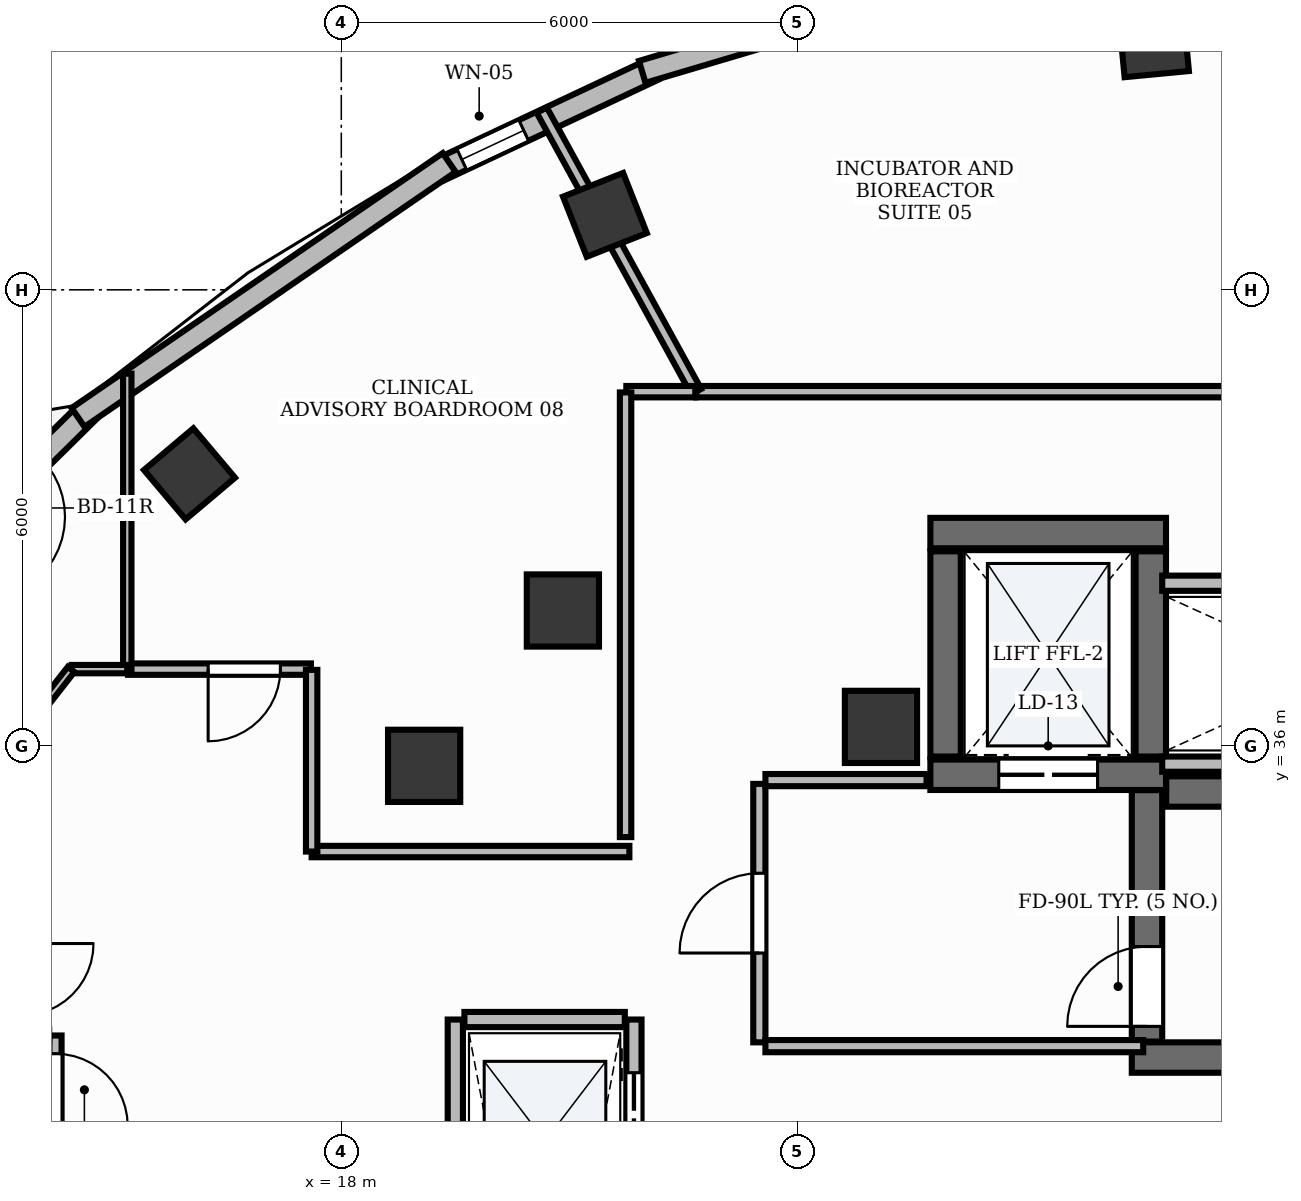
"""IFC4 building model, lengths in metres.
Left out: names, types, materials, properties, quantities, classifications, styles, units other than length and angle.
Written with IfcOpenShell. Run it as: python <this file> out.ifc"""

import sys

from ifc_helpers import new_model, si_unit, direction, frame, frame_2d, origin, origin_2d, place, context, subcontext, project, spatial, rectangle, extrude, element, fill, save


model = new_model("IFC4")
c1 = context("Model", 3, precision=1e-05, world=origin(), true_north=direction((0.0, 1.0)))
c2 = subcontext(c1, "Body", "Model", "MODEL_VIEW")
j1 = project(units=[si_unit("LENGTHUNIT", "METRE"), si_unit("PLANEANGLEUNIT", "RADIAN")], contexts=[c1])
p1 = place(None, origin())
s1 = spatial("IfcSite", under=j1, at=p1, CompositionType="ELEMENT")
p2 = place(p1, origin())
s2 = spatial("IfcBuilding", under=s1, at=p2, CompositionType="ELEMENT")
p3 = place(p2, frame((0.0, 0.0, 268.8)))
s3 = spatial("IfcBuildingStorey", under=s2, at=p3, CompositionType="ELEMENT", Elevation=268.8)
p4 = place(p3, frame((28.852, 35.4, 0.0), z_axis=(0.0, 0.0, 1.0), x_axis=(1.0, 0.0, 0.0)))
e1 = element("IfcWall", 1, at=p4, inside=s3, PredefinedType="SHEAR", context=c2, shape_type="SweptSolid", body=[
    extrude(rectangle(XDim=8.198, YDim=0.4, at=frame_2d((4.099, 0.0))), origin(), (0.0, 0.0, 1.0), 3.9),
])
p5 = place(p3, frame((28.4, 31.9, 0.0), z_axis=(0.0, 0.0, 1.0), x_axis=(1.0, 0.0, 0.0)))
e2 = element("IfcWall", 2, at=p5, inside=s3, PredefinedType="SHEAR", context=c2, shape_type="SweptSolid", body=[
    extrude(rectangle(XDim=8.65, YDim=0.4, at=frame_2d((4.325, 0.0))), origin(), (0.0, 0.0, 1.0), 3.9),
])
p6 = place(p3, frame((28.6, 32.11, 0.0), z_axis=(0.0, 0.0, 1.0), x_axis=(0.0, 1.0, 0.0)))
e3 = element("IfcWall", 3, at=p6, inside=s3, PredefinedType="SHEAR", context=c2, shape_type="SweptSolid", body=[
    extrude(rectangle(XDim=3.308, YDim=0.4, at=frame_2d((1.654, 0.0))), origin(), (0.0, 0.0, 1.0), 3.9),
])
p7 = place(p6, frame((0.2, 0.0, 0.0)))
e4 = element("IfcOpeningElement", 4, at=p7, cuts=e3, PredefinedType="OPENING", context=c2, shape_type="SweptSolid", body=[
    extrude(rectangle(XDim=1.05, YDim=2.15, at=frame_2d((0.525, 1.075))), frame((0.0, 0.215, 0.0), z_axis=(0.0, -1.0, 0.0), x_axis=(1.0, 0.0, 0.0)), (0.0, 0.0, 1.0), 0.43),
])
p8 = place(p3, frame((25.75, 38.8, 0.0), z_axis=(0.0, 0.0, 1.0), x_axis=(1.0, 0.0, 0.0)))
e5 = element("IfcWall", 5, at=p8, inside=s3, PredefinedType="SHEAR", context=c2, shape_type="SweptSolid", body=[
    extrude(rectangle(XDim=3.1, YDim=0.4, at=frame_2d((1.55, 0.0))), origin(), (0.0, 0.0, 1.0), 3.9),
])
p9 = place(p3, frame((25.75, 35.62, 0.0), z_axis=(0.0, 0.0, 1.0), x_axis=(1.0, 0.0, 0.0)))
e6 = element("IfcWall", 6, at=p9, inside=s3, PredefinedType="SHEAR", context=c2, shape_type="SweptSolid", body=[
    extrude(rectangle(XDim=3.1, YDim=0.4, at=frame_2d((1.55, 0.0))), origin(), (0.0, 0.0, 1.0), 3.9),
])
p10 = place(p9, frame((0.9, 0.0, 0.0)))
e7 = element("IfcOpeningElement", 7, at=p10, cuts=e6, PredefinedType="OPENING", context=c2, shape_type="SweptSolid", body=[
    extrude(rectangle(XDim=1.3, YDim=2.2, at=frame_2d((0.65, 1.1))), frame((0.0, 0.215, 0.0), z_axis=(0.0, -1.0, 0.0), x_axis=(1.0, 0.0, 0.0)), (0.0, 0.0, 1.0), 0.43),
])
for number, where, z_axis, x_axis in (
    (8, (25.95, 35.86, 0.0), (0.0, 0.0, 1.0), (0.0, 1.0, 0.0)),
    (9, (28.65, 35.86, 0.0), (0.0, 0.0, 1.0), (0.0, 1.0, 0.0)),
):
    element("IfcWall", number, at=place(p3, frame(where, z_axis=z_axis, x_axis=x_axis)), inside=s3, PredefinedType="SHEAR", context=c2, shape_type="SweptSolid", body=[
        extrude(rectangle(XDim=2.7, YDim=0.4, at=frame_2d((1.35, 0.0))), origin(), (0.0, 0.0, 1.0), 3.9),
    ])
p11 = place(p3, frame((25.1, 36.25, -0.0), z_axis=(0.0, 0.0, 1.0), x_axis=(1.0, 0.0, 0.0)))
e10 = element("IfcColumn", 10, at=p11, inside=s3, PredefinedType="PILASTER", context=c2, shape_type="SweptSolid", body=[
    extrude(rectangle(XDim=0.95, YDim=0.95, at=origin_2d()), origin(), (0.0, 0.0, 1.0), 3.901),
])
for number, where, z_axis, x_axis in (
    (11, (28.688, 45.261, -0.0), (0.0, 0.0, 1.0), (0.995, 0.095, 0.0)),
    (12, (21.469, 42.986, -0.0), (0.0, 0.0, 1.0), (0.93, 0.367, 0.0)),
    (13, (16.003, 39.579, -0.0), (0.0, 0.0, 1.0), (0.764, 0.645, 0.0)),
):
    element("IfcColumn", number, at=place(p3, frame(where, z_axis=z_axis, x_axis=x_axis)), inside=s3, PredefinedType="COLUMN", context=c2, shape_type="SweptSolid", body=[
        extrude(rectangle(XDim=0.85, YDim=0.85, at=origin_2d()), origin(), (0.0, 0.0, 1.0), 3.901),
    ])
for number, where, z_axis, x_axis in (
    (14, (20.915, 37.781, -0.0), (0.0, 0.0, 1.0), (1.0, 0.0, 0.0)),
    (15, (19.09, 35.738, -0.0), (0.0, 0.0, 1.0), (1.0, 0.0, 0.0)),
):
    element("IfcColumn", number, at=place(p3, frame(where, z_axis=z_axis, x_axis=x_axis)), inside=s3, PredefinedType="COLUMN", context=c2, shape_type="SweptSolid", body=[
        extrude(rectangle(XDim=0.95, YDim=0.95, at=origin_2d()), origin(), (0.0, 0.0, 1.0), 3.901),
    ])
p12 = place(p3, frame((22.118, 44.905, 0.0), z_axis=(0.0, 0.0, 1.0), x_axis=(-0.904969006582, -0.425477493089, 0.0)))
e16 = element("IfcWall", 16, at=p12, inside=s3, PredefinedType="STANDARD", context=c2, shape_type="SweptSolid", body=[
    extrude(rectangle(XDim=3.128, YDim=0.3, at=frame_2d((1.564, 0.0))), origin(), (0.0, 0.0, 1.0), 3.9),
])
p13 = place(p12, frame((1.899, 0.0, 0.95)))
e17 = element("IfcOpeningElement", 17, at=p13, cuts=e16, PredefinedType="OPENING", context=c2, shape_type="SweptSolid", body=[
    extrude(rectangle(XDim=0.9, YDim=1.8, at=frame_2d((0.45, 0.9))), frame((0.0, 0.165, 0.0), z_axis=(0.0, -1.0, 0.0), x_axis=(1.0, 0.0, 0.0)), (0.0, 0.0, 1.0), 0.33),
])
p14 = place(p3, frame((14.679, 40.411, 0.0), z_axis=(0.0, 0.0, 1.0), x_axis=(-0.711382793294, -0.702804753403, 0.0)))
e18 = element("IfcWall", 18, at=p14, inside=s3, PredefinedType="STANDARD", context=c2, shape_type="SweptSolid", body=[
    extrude(rectangle(XDim=2.875, YDim=0.3, at=frame_2d((1.437, 0.0))), origin(), (0.0, 0.0, 1.0), 3.9),
])
p15 = place(p14, frame((0.887, 0.0, 0.0)))
e19 = element("IfcOpeningElement", 19, at=p15, cuts=e18, PredefinedType="OPENING", context=c2, shape_type="SweptSolid", body=[
    extrude(rectangle(XDim=1.1, YDim=2.15, at=frame_2d((0.55, 1.075))), frame((0.0, 0.165, 0.0), z_axis=(0.0, -1.0, 0.0), x_axis=(1.0, 0.0, 0.0)), (0.0, 0.0, 1.0), 0.33),
])
p16 = place(p3, frame((28.055, 46.677, 0.0), z_axis=(0.0, 0.0, 1.0), x_axis=(-0.958650794435, -0.284585056406, 0.0)))
e20 = element("IfcWall", 20, at=p16, inside=s3, PredefinedType="STANDARD", context=c2, shape_type="SweptSolid", body=[
    extrude(rectangle(XDim=6.359, YDim=0.3, at=frame_2d((3.179, 0.0))), origin(), (0.0, 0.0, 1.0), 3.47),
])
p17 = place(p3, frame((19.419, 43.675, 0.0), z_axis=(0.0, 0.0, 1.0), x_axis=(-0.824290809052, -0.566166638113, 0.0)))
e21 = element("IfcWall", 21, at=p17, inside=s3, PredefinedType="STANDARD", context=c2, shape_type="SweptSolid", body=[
    extrude(rectangle(XDim=5.923, YDim=0.3, at=frame_2d((2.961, 0.0))), origin(), (0.0, 0.0, 1.0), 3.9),
])
p18 = place(p3, frame((19.5, 21.6, 0.0), z_axis=(0.0, 0.0, 1.0), x_axis=(0.0, 1.0, 0.0)))
e22 = element("IfcWall", 22, at=p18, inside=s3, PredefinedType="PARTITIONING", context=c2, shape_type="SweptSolid", body=[
    extrude(rectangle(XDim=10.8, YDim=0.2, at=frame_2d((5.4, 0.0))), origin(), (0.0, 0.0, 1.0), 2.91),
])
p19 = place(p3, frame((21.85, 21.6, 0.0), z_axis=(0.0, 0.0, 1.0), x_axis=(0.0, 1.0, 0.0)))
e23 = element("IfcWall", 23, at=p19, inside=s3, PredefinedType="PARTITIONING", context=c2, shape_type="SweptSolid", body=[
    extrude(rectangle(XDim=10.8, YDim=0.2, at=frame_2d((5.4, 0.0))), origin(), (0.0, 0.0, 1.0), 2.91),
])
p20 = place(p19, frame((0.9, 0.0, 0.0)))
e24 = element("IfcOpeningElement", 24, at=p20, cuts=e23, PredefinedType="OPENING", context=c2, shape_type="SweptSolid", body=[
    extrude(rectangle(XDim=1.1, YDim=2.2, at=frame_2d((0.55, 1.1))), frame((0.0, 0.115, 0.0), z_axis=(0.0, -1.0, 0.0), x_axis=(1.0, 0.0, 0.0)), (0.0, 0.0, 1.0), 0.23),
])
p21 = place(p19, frame((3.6, 0.0, 0.0)))
e25 = element("IfcOpeningElement", 25, at=p21, cuts=e23, PredefinedType="OPENING", context=c2, shape_type="SweptSolid", body=[
    extrude(rectangle(XDim=1.1, YDim=2.2, at=frame_2d((0.55, 1.1))), frame((0.0, 0.115, 0.0), z_axis=(0.0, -1.0, 0.0), x_axis=(1.0, 0.0, 0.0)), (0.0, 0.0, 1.0), 0.23),
])
p22 = place(p19, frame((6.3, 0.0, 0.0)))
e26 = element("IfcOpeningElement", 26, at=p22, cuts=e23, PredefinedType="OPENING", context=c2, shape_type="SweptSolid", body=[
    extrude(rectangle(XDim=1.1, YDim=2.2, at=frame_2d((0.55, 1.1))), frame((0.0, 0.115, 0.0), z_axis=(0.0, -1.0, 0.0), x_axis=(1.0, 0.0, 0.0)), (0.0, 0.0, 1.0), 0.23),
])
p23 = place(p19, frame((9.0, 0.0, 0.0)))
e27 = element("IfcOpeningElement", 27, at=p23, cuts=e23, PredefinedType="OPENING", context=c2, shape_type="SweptSolid", body=[
    extrude(rectangle(XDim=1.1, YDim=2.2, at=frame_2d((0.55, 1.1))), frame((0.0, 0.115, 0.0), z_axis=(0.0, -1.0, 0.0), x_axis=(1.0, 0.0, 0.0)), (0.0, 0.0, 1.0), 0.23),
])
p24 = place(p3, frame((19.62, 32.4, 0.0), z_axis=(0.0, 0.0, 1.0), x_axis=(1.0, 0.0, 0.0)))
e28 = element("IfcWall", 28, at=p24, inside=s3, PredefinedType="PARTITIONING", context=c2, shape_type="SweptSolid", body=[
    extrude(rectangle(XDim=2.11, YDim=0.2, at=frame_2d((1.055, 0.0))), origin(), (0.0, 0.0, 1.0), 2.91),
])
for number, where, z_axis, x_axis in (
    (29, (28.8, 35.76, 0.0), (0.0, 0.0, 1.0), (1.0, 0.0, 0.0)),
    (30, (28.8, 38.14, 0.0), (0.0, 0.0, 1.0), (1.0, 0.0, 0.0)),
):
    element("IfcWall", number, at=place(p3, frame(where, z_axis=z_axis, x_axis=x_axis)), inside=s3, PredefinedType="PARTITIONING", context=c2, shape_type="SweptSolid", body=[
        extrude(rectangle(XDim=4.57, YDim=0.2, at=frame_2d((2.285, 0.0))), origin(), (0.0, 0.0, 1.0), 2.91),
    ])
p25 = place(p3, frame((23.5, 32.1, 0.0), z_axis=(0.0, 0.0, 1.0), x_axis=(0.0, 1.0, 0.0)))
e31 = element("IfcWall", 31, at=p25, inside=s3, PredefinedType="PARTITIONING", context=c2, shape_type="SweptSolid", body=[
    extrude(rectangle(XDim=3.4, YDim=0.16, at=frame_2d((1.7, 0.0))), origin(), (0.0, 0.0, 1.0), 2.91),
])
p26 = place(p25, frame((1.175, 0.0, 0.0)))
e32 = element("IfcOpeningElement", 32, at=p26, cuts=e31, PredefinedType="OPENING", context=c2, shape_type="SweptSolid", body=[
    extrude(rectangle(XDim=1.05, YDim=2.15, at=frame_2d((0.525, 1.075))), frame((0.0, 0.095, 0.0), z_axis=(0.0, -1.0, 0.0), x_axis=(1.0, 0.0, 0.0)), (0.0, 0.0, 1.0), 0.19),
])
p27 = place(p3, frame((23.58, 32.05, 0.0), z_axis=(0.0, 0.0, 1.0), x_axis=(1.0, 0.0, 0.0)))
e33 = element("IfcWall", 33, at=p27, inside=s3, PredefinedType="PARTITIONING", context=c2, shape_type="SweptSolid", body=[
    extrude(rectangle(XDim=4.97, YDim=0.16, at=frame_2d((2.485, 0.0))), origin(), (0.0, 0.0, 1.0), 2.91),
])
p28 = place(p3, frame((23.58, 35.55, 0.0), z_axis=(0.0, 0.0, 1.0), x_axis=(1.0, 0.0, 0.0)))
e34 = element("IfcWall", 34, at=p28, inside=s3, PredefinedType="PARTITIONING", context=c2, shape_type="SweptSolid", body=[
    extrude(rectangle(XDim=2.12, YDim=0.16, at=frame_2d((1.06, 0.0))), origin(), (0.0, 0.0, 1.0), 2.91),
])
p29 = place(p3, frame((14.24, 32.19, 0.0), z_axis=(0.0, 0.0, 1.0), x_axis=(0.0, -1.0, 0.0)))
e35 = element("IfcWall", 35, at=p29, inside=s3, PredefinedType="PARTITIONING", context=c2, shape_type="SweptSolid", body=[
    extrude(rectangle(XDim=4.99, YDim=0.16, at=frame_2d((2.495, 0.0))), origin(), (0.0, 0.0, 1.0), 2.91),
])
p30 = place(p29, frame((0.24, 0.0, 0.0)))
e36 = element("IfcOpeningElement", 36, at=p30, cuts=e35, PredefinedType="OPENING", context=c2, shape_type="SweptSolid", body=[
    extrude(rectangle(XDim=0.95, YDim=2.15, at=frame_2d((0.475, 1.075))), frame((0.0, 0.095, 0.0), z_axis=(0.0, -1.0, 0.0), x_axis=(1.0, 0.0, 0.0)), (0.0, 0.0, 1.0), 0.19),
])
p31 = place(p3, frame((31.806, 40.66, 0.0), z_axis=(0.0, 0.0, 1.0), x_axis=(-1.0, 0.0, 0.0)))
e37 = element("IfcWall", 37, at=p31, inside=s3, PredefinedType="PARTITIONING", context=c2, shape_type="SweptSolid", body=[
    extrude(rectangle(XDim=9.136, YDim=0.15, at=frame_2d((4.568, 0.0))), origin(), (0.0, 0.0, 1.0), 2.91),
])
p32 = place(p31, frame((0.257, 0.0, 0.0)))
e38 = element("IfcOpeningElement", 38, at=p32, cuts=e37, PredefinedType="OPENING", context=c2, shape_type="SweptSolid", body=[
    extrude(rectangle(XDim=0.95, YDim=2.15, at=frame_2d((0.475, 1.075))), frame((0.0, 0.09, 0.0), z_axis=(0.0, -1.0, 0.0), x_axis=(1.0, 0.0, 0.0)), (0.0, 0.0, 1.0), 0.18),
])
p33 = place(p3, frame((17.6, 37.01, 0.0), z_axis=(0.0, 0.0, 1.0), x_axis=(-1.0, 0.0, 0.0)))
e39 = element("IfcWall", 39, at=p33, inside=s3, PredefinedType="PARTITIONING", context=c2, shape_type="SweptSolid", body=[
    extrude(rectangle(XDim=2.406, YDim=0.15, at=frame_2d((1.203, 0.0))), origin(), (0.0, 0.0, 1.0), 2.91),
])
p34 = place(p33, frame((0.402, 0.0, 0.0)))
e40 = element("IfcOpeningElement", 40, at=p34, cuts=e39, PredefinedType="OPENING", context=c2, shape_type="SweptSolid", body=[
    extrude(rectangle(XDim=0.95, YDim=2.15, at=frame_2d((0.475, 1.075))), frame((0.0, 0.09, 0.0), z_axis=(0.0, -1.0, 0.0), x_axis=(1.0, 0.0, 0.0)), (0.0, 0.0, 1.0), 0.18),
])
p35 = place(p3, frame((22.669, 40.66, 0.0), z_axis=(0.0, 0.0, 1.0), x_axis=(-0.480944413436, 0.8767510885, 0.0)))
e41 = element("IfcWall", 41, at=p35, inside=s3, PredefinedType="PARTITIONING", context=c2, shape_type="SweptSolid", body=[
    extrude(rectangle(XDim=4.224, YDim=0.15, at=frame_2d((2.112, 0.0))), origin(), (0.0, 0.0, 1.0), 2.91),
])
p36 = place(p3, frame((15.184, 40.897, 0.0), z_axis=(0.0, 0.0, 1.0), x_axis=(0.0, -1.0, 0.0)))
e42 = element("IfcWall", 42, at=p36, inside=s3, PredefinedType="MOVABLE", context=c2, shape_type="SweptSolid", body=[
    extrude(rectangle(XDim=3.887, YDim=0.11, at=frame_2d((1.943, 0.0))), origin(), (0.0, 0.0, 1.0), 2.91),
])
p37 = place(p3, frame((15.184, 37.01, 0.0), z_axis=(0.0, 0.0, 1.0), x_axis=(-1.0, 0.0, 0.0)))
e43 = element("IfcWall", 43, at=p37, inside=s3, PredefinedType="MOVABLE", context=c2, shape_type="SweptSolid", body=[
    extrude(rectangle(XDim=0.732, YDim=0.11, at=frame_2d((0.366, 0.0))), origin(), (0.0, 0.0, 1.0), 2.91),
])
p38 = place(p3, frame((14.445, 37.006, 0.0), z_axis=(0.0, 0.0, 1.0), x_axis=(-0.615836200745, -0.787874211948, 0.0)))
e44 = element("IfcWall", 44, at=p38, inside=s3, PredefinedType="MOVABLE", context=c2, shape_type="SweptSolid", body=[
    extrude(rectangle(XDim=1.06, YDim=0.11, at=frame_2d((0.53, 0.0))), origin(), (0.0, 0.0, 1.0), 2.91),
])
p39 = place(p3, frame((22.658, 40.66, 0.0), z_axis=(0.0, 0.0, 1.0), x_axis=(-1.0, 0.0, 0.0)))
e45 = element("IfcWall", 45, at=p39, inside=s3, PredefinedType="PARTITIONING", context=c2, shape_type="SweptSolid", body=[
    extrude(rectangle(XDim=0.908, YDim=0.15, at=frame_2d((0.454, 0.0))), origin(), (0.0, 0.0, 1.0), 2.91),
])
p40 = place(p3, frame((21.74, 40.65, 0.0), z_axis=(0.0, 0.0, 1.0), x_axis=(0.0, -1.0, 0.0)))
e46 = element("IfcWall", 46, at=p40, inside=s3, PredefinedType="PARTITIONING", context=c2, shape_type="SweptSolid", body=[
    extrude(rectangle(XDim=5.85, YDim=0.15, at=frame_2d((2.925, 0.0))), origin(), (0.0, 0.0, 1.0), 2.91),
])
p41 = place(p3, frame((21.79, 34.61, 0.0), z_axis=(0.0, 0.0, 1.0), x_axis=(-1.0, 0.0, 0.0)))
e47 = element("IfcWall", 47, at=p41, inside=s3, PredefinedType="PARTITIONING", context=c2, shape_type="SweptSolid", body=[
    extrude(rectangle(XDim=4.18, YDim=0.15, at=frame_2d((2.09, 0.0))), origin(), (0.0, 0.0, 1.0), 2.91),
])
p42 = place(p3, frame((17.61, 34.61, 0.0), z_axis=(0.0, 0.0, 1.0), x_axis=(0.0, 1.0, 0.0)))
e48 = element("IfcWall", 48, at=p42, inside=s3, PredefinedType="PARTITIONING", context=c2, shape_type="SweptSolid", body=[
    extrude(rectangle(XDim=2.39, YDim=0.15, at=frame_2d((1.195, 0.0))), origin(), (0.0, 0.0, 1.0), 2.91),
])
p43 = place(p13, origin())
e49 = element("IfcWindow", 49, at=p43, inside=s3, PartitioningType="SINGLE_PANEL", PredefinedType="WINDOW", context=c2, shape_type="SweptSolid", body=[
    extrude(rectangle(XDim=0.9, YDim=1.8, at=frame_2d((0.45, 0.9))), frame((0.0, 0.03, 0.0), z_axis=(0.0, -1.0, 0.0), x_axis=(1.0, 0.0, 0.0)), (0.0, 0.0, 1.0), 0.06),
])
fill(e17, e49)
p44 = place(p7, origin())
e50 = element("IfcDoor", 50, at=p44, inside=s3, OperationType="SINGLE_SWING_LEFT", PredefinedType="DOOR", context=c2, shape_type="SweptSolid", body=[
    extrude(rectangle(XDim=1.05, YDim=2.15, at=frame_2d((0.525, 1.075))), frame((0.0, 0.025, 0.0), z_axis=(0.0, -1.0, 0.0), x_axis=(1.0, 0.0, 0.0)), (0.0, 0.0, 1.0), 0.05),
])
fill(e4, e50)
p45 = place(p23, origin())
e51 = element("IfcDoor", 51, at=p45, inside=s3, OperationType="DOUBLE_DOOR_SLIDING", PredefinedType="DOOR", context=c2, shape_type="SweptSolid", body=[
    extrude(rectangle(XDim=1.1, YDim=2.2, at=frame_2d((0.55, 1.1))), frame((0.0, 0.025, 0.0), z_axis=(0.0, -1.0, 0.0), x_axis=(1.0, 0.0, 0.0)), (0.0, 0.0, 1.0), 0.05),
])
fill(e27, e51)
p46 = place(p10, origin())
e52 = element("IfcDoor", 52, at=p46, inside=s3, OperationType="DOUBLE_DOOR_SLIDING", PredefinedType="DOOR", context=c2, shape_type="SweptSolid", body=[
    extrude(rectangle(XDim=1.3, YDim=2.2, at=frame_2d((0.65, 1.1))), frame((0.0, 0.025, 0.0), z_axis=(0.0, -1.0, 0.0), x_axis=(1.0, 0.0, 0.0)), (0.0, 0.0, 1.0), 0.05),
])
fill(e7, e52)
p47 = place(p26, origin())
e53 = element("IfcDoor", 53, at=p47, inside=s3, OperationType="SINGLE_SWING_LEFT", PredefinedType="DOOR", context=c2, shape_type="SweptSolid", body=[
    extrude(rectangle(XDim=1.05, YDim=2.15, at=frame_2d((0.525, 1.075))), frame((0.0, 0.025, 0.0), z_axis=(0.0, -1.0, 0.0), x_axis=(1.0, 0.0, 0.0)), (0.0, 0.0, 1.0), 0.05),
])
fill(e32, e53)
p48 = place(p30, origin())
e54 = element("IfcDoor", 54, at=p48, inside=s3, OperationType="SINGLE_SWING_RIGHT", PredefinedType="DOOR", context=c2, shape_type="SweptSolid", body=[
    extrude(rectangle(XDim=0.95, YDim=2.15, at=frame_2d((0.475, 1.075))), frame((0.0, 0.025, 0.0), z_axis=(0.0, -1.0, 0.0), x_axis=(1.0, 0.0, 0.0)), (0.0, 0.0, 1.0), 0.05),
])
fill(e36, e54)
p49 = place(p34, origin())
e55 = element("IfcDoor", 55, at=p49, inside=s3, OperationType="SINGLE_SWING_RIGHT", PredefinedType="DOOR", context=c2, shape_type="SweptSolid", body=[
    extrude(rectangle(XDim=0.95, YDim=2.15, at=frame_2d((0.475, 1.075))), frame((0.0, 0.025, 0.0), z_axis=(0.0, -1.0, 0.0), x_axis=(1.0, 0.0, 0.0)), (0.0, 0.0, 1.0), 0.05),
])
fill(e40, e55)
save(model, sys.argv[1])
